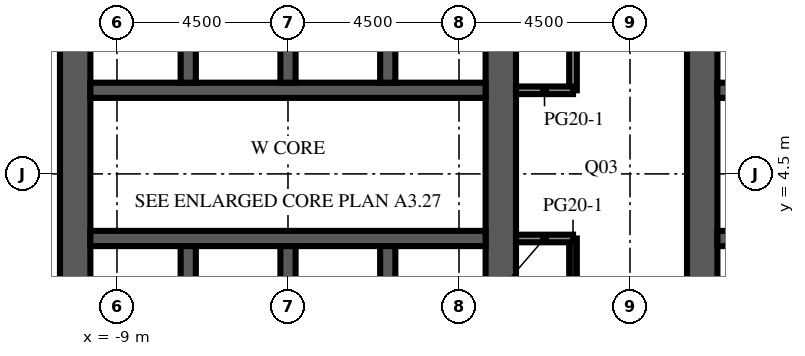
"""IFC4 building model, lengths in metres.
Left out: names, types, materials, properties, quantities, classifications, styles, units other than length and angle.
Written with IfcOpenShell. Run it as: python <this file> out.ifc"""

import sys

from ifc_helpers import new_model, si_unit, direction, frame, frame_2d, origin, place, context, subcontext, project, spatial, rectangle, extrude, element, fill, save


model = new_model("IFC4")
c1 = context("Model", 3, precision=1e-05, world=origin(), true_north=direction((0.0, 1.0)))
c2 = subcontext(c1, "Body", "Model", "MODEL_VIEW")
j1 = project(units=[si_unit("LENGTHUNIT", "METRE"), si_unit("PLANEANGLEUNIT", "RADIAN")], contexts=[c1])
p1 = place(None, origin())
s1 = spatial("IfcSite", under=j1, at=p1, CompositionType="ELEMENT")
p2 = place(p1, origin())
s2 = spatial("IfcBuilding", under=s1, at=p2, CompositionType="ELEMENT")
p3 = place(p2, frame((0.0, 0.0, 177.3)))
s3 = spatial("IfcBuildingStorey", under=s2, at=p3, CompositionType="ELEMENT", Elevation=177.3)
p4 = place(p3, frame((-10.1, -9.0, 0.0), z_axis=(0.0, 0.0, 1.0), x_axis=(0.0, 1.0, 0.0)))
e1 = element("IfcWall", 1, at=p4, inside=s3, PredefinedType="SHEAR", context=c2, shape_type="SweptSolid", body=[
    extrude(rectangle(XDim=27.5, YDim=0.8, at=frame_2d((13.75, 0.0))), origin(), (0.0, 0.0, 1.0), 4.1),
])
p5 = place(p4, frame((12.55, 0.0, 0.0)))
e2 = element("IfcOpeningElement", 2, at=p5, cuts=e1, PredefinedType="OPENING", context=c2, shape_type="SweptSolid", body=[
    extrude(rectangle(XDim=2.4, YDim=2.4, at=frame_2d((1.2, 1.2))), frame((0.0, 0.41, 0.0), z_axis=(0.0, -1.0, 0.0), x_axis=(1.0, 0.0, 0.0)), (0.0, 0.0, 1.0), 0.82),
])
p6 = place(p4, frame((6.825, 0.0, 0.0)))
e3 = element("IfcOpeningElement", 3, at=p6, cuts=e1, PredefinedType="OPENING", context=c2, shape_type="SweptSolid", body=[
    extrude(rectangle(XDim=1.2, YDim=2.1, at=frame_2d((0.6, 1.05))), frame((0.0, 0.41, 0.0), z_axis=(0.0, -1.0, 0.0), x_axis=(1.0, 0.0, 0.0)), (0.0, 0.0, 1.0), 0.82),
])
p7 = place(p4, frame((19.475, 0.0, 0.0)))
e4 = element("IfcOpeningElement", 4, at=p7, cuts=e1, PredefinedType="OPENING", context=c2, shape_type="SweptSolid", body=[
    extrude(rectangle(XDim=1.2, YDim=2.1, at=frame_2d((0.6, 1.05))), frame((0.0, 0.41, 0.0), z_axis=(0.0, -1.0, 0.0), x_axis=(1.0, 0.0, 0.0)), (0.0, 0.0, 1.0), 0.82),
])
p8 = place(p3, frame((1.1, -9.0, 0.0), z_axis=(0.0, 0.0, 1.0), x_axis=(0.0, 1.0, 0.0)))
e5 = element("IfcWall", 5, at=p8, inside=s3, PredefinedType="SHEAR", context=c2, shape_type="SweptSolid", body=[
    extrude(rectangle(XDim=27.5, YDim=0.8, at=frame_2d((13.75, 0.0))), origin(), (0.0, 0.0, 1.0), 4.1),
])
p9 = place(p8, frame((12.55, 0.0, 0.0)))
e6 = element("IfcOpeningElement", 6, at=p9, cuts=e5, PredefinedType="OPENING", context=c2, shape_type="SweptSolid", body=[
    extrude(rectangle(XDim=2.4, YDim=2.4, at=frame_2d((1.2, 1.2))), frame((0.0, 0.41, 0.0), z_axis=(0.0, -1.0, 0.0), x_axis=(1.0, 0.0, 0.0)), (0.0, 0.0, 1.0), 0.82),
])
p10 = place(p8, frame((3.85, 0.0, 0.0)))
e7 = element("IfcOpeningElement", 7, at=p10, cuts=e5, PredefinedType="OPENING", context=c2, shape_type="SweptSolid", body=[
    extrude(rectangle(XDim=0.95, YDim=2.1, at=frame_2d((0.475, 1.05))), frame((0.0, 0.41, 0.0), z_axis=(0.0, -1.0, 0.0), x_axis=(1.0, 0.0, 0.0)), (0.0, 0.0, 1.0), 0.82),
])
p11 = place(p8, frame((23.475, 0.0, 0.0)))
e8 = element("IfcOpeningElement", 8, at=p11, cuts=e5, PredefinedType="OPENING", context=c2, shape_type="SweptSolid", body=[
    extrude(rectangle(XDim=1.2, YDim=2.1, at=frame_2d((0.6, 1.05))), frame((0.0, 0.41, 0.0), z_axis=(0.0, -1.0, 0.0), x_axis=(1.0, 0.0, 0.0)), (0.0, 0.0, 1.0), 0.82),
])
p12 = place(p3, frame((-9.7, 2.8, 0.0), z_axis=(0.0, 0.0, 1.0), x_axis=(1.0, 0.0, 0.0)))
e9 = element("IfcWall", 9, at=p12, inside=s3, PredefinedType="SHEAR", context=c2, shape_type="SweptSolid", body=[
    extrude(rectangle(XDim=10.4, YDim=0.4, at=frame_2d((5.2, 0.0))), origin(), (0.0, 0.0, 1.0), 4.1),
])
p13 = place(p12, frame((0.738, 0.0, 0.0)))
e10 = element("IfcOpeningElement", 10, at=p13, cuts=e9, PredefinedType="OPENING", context=c2, shape_type="SweptSolid", body=[
    extrude(rectangle(XDim=1.1, YDim=2.1, at=frame_2d((0.55, 1.05))), frame((0.0, 0.21, 0.0), z_axis=(0.0, -1.0, 0.0), x_axis=(1.0, 0.0, 0.0)), (0.0, 0.0, 1.0), 0.42),
])
p14 = place(p12, frame((3.337, 0.0, 0.0)))
e11 = element("IfcOpeningElement", 11, at=p14, cuts=e9, PredefinedType="OPENING", context=c2, shape_type="SweptSolid", body=[
    extrude(rectangle(XDim=1.1, YDim=2.1, at=frame_2d((0.55, 1.05))), frame((0.0, 0.21, 0.0), z_axis=(0.0, -1.0, 0.0), x_axis=(1.0, 0.0, 0.0)), (0.0, 0.0, 1.0), 0.42),
])
p15 = place(p12, frame((6.012, 0.0, 0.0)))
e12 = element("IfcOpeningElement", 12, at=p15, cuts=e9, PredefinedType="OPENING", context=c2, shape_type="SweptSolid", body=[
    extrude(rectangle(XDim=1.0, YDim=2.1, at=frame_2d((0.5, 1.05))), frame((0.0, 0.21, 0.0), z_axis=(0.0, -1.0, 0.0), x_axis=(1.0, 0.0, 0.0)), (0.0, 0.0, 1.0), 0.42),
])
p16 = place(p12, frame((8.613, 0.0, 0.0)))
e13 = element("IfcOpeningElement", 13, at=p16, cuts=e9, PredefinedType="OPENING", context=c2, shape_type="SweptSolid", body=[
    extrude(rectangle(XDim=1.0, YDim=2.1, at=frame_2d((0.5, 1.05))), frame((0.0, 0.21, 0.0), z_axis=(0.0, -1.0, 0.0), x_axis=(1.0, 0.0, 0.0)), (0.0, 0.0, 1.0), 0.42),
])
p17 = place(p3, frame((-9.7, 6.7, 0.0), z_axis=(0.0, 0.0, 1.0), x_axis=(1.0, 0.0, 0.0)))
e14 = element("IfcWall", 14, at=p17, inside=s3, PredefinedType="SHEAR", context=c2, shape_type="SweptSolid", body=[
    extrude(rectangle(XDim=10.4, YDim=0.4, at=frame_2d((5.2, 0.0))), origin(), (0.0, 0.0, 1.0), 4.1),
])
p18 = place(p17, frame((3.337, 0.0, 0.0)))
e15 = element("IfcOpeningElement", 15, at=p18, cuts=e14, PredefinedType="OPENING", context=c2, shape_type="SweptSolid", body=[
    extrude(rectangle(XDim=1.1, YDim=2.1, at=frame_2d((0.55, 1.05))), frame((0.0, 0.21, 0.0), z_axis=(0.0, -1.0, 0.0), x_axis=(1.0, 0.0, 0.0)), (0.0, 0.0, 1.0), 0.42),
])
p19 = place(p17, frame((5.962, 0.0, 0.0)))
e16 = element("IfcOpeningElement", 16, at=p19, cuts=e14, PredefinedType="OPENING", context=c2, shape_type="SweptSolid", body=[
    extrude(rectangle(XDim=1.1, YDim=2.1, at=frame_2d((0.55, 1.05))), frame((0.0, 0.21, 0.0), z_axis=(0.0, -1.0, 0.0), x_axis=(1.0, 0.0, 0.0)), (0.0, 0.0, 1.0), 0.42),
])
p20 = place(p17, frame((8.663, 0.0, 0.0)))
e17 = element("IfcOpeningElement", 17, at=p20, cuts=e14, PredefinedType="OPENING", context=c2, shape_type="SweptSolid", body=[
    extrude(rectangle(XDim=1.1, YDim=2.1, at=frame_2d((0.55, 1.05))), frame((0.0, 0.21, 0.0), z_axis=(0.0, -1.0, 0.0), x_axis=(1.0, 0.0, 0.0)), (0.0, 0.0, 1.0), 0.42),
])
p21 = place(p17, frame((0.688, 0.0, 0.0)))
e18 = element("IfcOpeningElement", 18, at=p21, cuts=e14, PredefinedType="OPENING", context=c2, shape_type="SweptSolid", body=[
    extrude(rectangle(XDim=1.0, YDim=2.1, at=frame_2d((0.5, 1.05))), frame((0.0, 0.21, 0.0), z_axis=(0.0, -1.0, 0.0), x_axis=(1.0, 0.0, 0.0)), (0.0, 0.0, 1.0), 0.42),
])
for number, where, z_axis, x_axis in (
    (19, (-7.125, -0.3, 0.0), (0.0, 0.0, 1.0), (0.0, 1.0, 0.0)),
    (20, (-7.125, 6.9, 0.0), (0.0, 0.0, 1.0), (0.0, 1.0, 0.0)),
    (21, (-4.5, -0.3, 0.0), (0.0, 0.0, 1.0), (0.0, 1.0, 0.0)),
    (22, (-4.5, 6.9, 0.0), (0.0, 0.0, 1.0), (0.0, 1.0, 0.0)),
    (23, (-1.875, -0.3, 0.0), (0.0, 0.0, 1.0), (0.0, 1.0, 0.0)),
    (24, (-1.875, 6.9, 0.0), (0.0, 0.0, 1.0), (0.0, 1.0, 0.0)),
):
    element("IfcWall", number, at=place(p3, frame(where, z_axis=z_axis, x_axis=x_axis)), inside=s3, PredefinedType="SHEAR", context=c2, shape_type="SweptSolid", body=[
        extrude(rectangle(XDim=2.9, YDim=0.4, at=frame_2d((1.45, 0.0))), origin(), (0.0, 0.0, 1.0), 4.1),
    ])
p22 = place(p3, frame((6.4, -9.0, 0.0), z_axis=(0.0, 0.0, 1.0), x_axis=(0.0, 1.0, 0.0)))
e25 = element("IfcWall", 25, at=p22, inside=s3, PredefinedType="SHEAR", context=c2, shape_type="SweptSolid", body=[
    extrude(rectangle(XDim=27.5, YDim=0.8, at=frame_2d((13.75, 0.0))), origin(), (0.0, 0.0, 1.0), 4.1),
])
p23 = place(p22, frame((12.55, 0.0, 0.0)))
e26 = element("IfcOpeningElement", 26, at=p23, cuts=e25, PredefinedType="OPENING", context=c2, shape_type="SweptSolid", body=[
    extrude(rectangle(XDim=2.4, YDim=2.4, at=frame_2d((1.2, 1.2))), frame((0.0, 0.41, 0.0), z_axis=(0.0, -1.0, 0.0), x_axis=(1.0, 0.0, 0.0)), (0.0, 0.0, 1.0), 0.82),
])
p24 = place(p22, frame((3.85, 0.0, 0.0)))
e27 = element("IfcOpeningElement", 27, at=p24, cuts=e25, PredefinedType="OPENING", context=c2, shape_type="SweptSolid", body=[
    extrude(rectangle(XDim=0.95, YDim=2.1, at=frame_2d((0.475, 1.05))), frame((0.0, 0.41, 0.0), z_axis=(0.0, -1.0, 0.0), x_axis=(1.0, 0.0, 0.0)), (0.0, 0.0, 1.0), 0.82),
])
p25 = place(p22, frame((23.475, 0.0, 0.0)))
e28 = element("IfcOpeningElement", 28, at=p25, cuts=e25, PredefinedType="OPENING", context=c2, shape_type="SweptSolid", body=[
    extrude(rectangle(XDim=1.2, YDim=2.1, at=frame_2d((0.6, 1.05))), frame((0.0, 0.41, 0.0), z_axis=(0.0, -1.0, 0.0), x_axis=(1.0, 0.0, 0.0)), (0.0, 0.0, 1.0), 0.82),
])
p26 = place(p3, frame((6.8, 2.8, 0.0), z_axis=(0.0, 0.0, 1.0), x_axis=(1.0, 0.0, 0.0)))
e29 = element("IfcWall", 29, at=p26, inside=s3, PredefinedType="SHEAR", context=c2, shape_type="SweptSolid", body=[
    extrude(rectangle(XDim=10.4, YDim=0.4, at=frame_2d((5.2, 0.0))), origin(), (0.0, 0.0, 1.0), 4.1),
])
p27 = place(p26, frame((0.738, 0.0, 0.0)))
e30 = element("IfcOpeningElement", 30, at=p27, cuts=e29, PredefinedType="OPENING", context=c2, shape_type="SweptSolid", body=[
    extrude(rectangle(XDim=1.1, YDim=2.1, at=frame_2d((0.55, 1.05))), frame((0.0, 0.21, 0.0), z_axis=(0.0, -1.0, 0.0), x_axis=(1.0, 0.0, 0.0)), (0.0, 0.0, 1.0), 0.42),
])
p28 = place(p26, frame((3.337, 0.0, 0.0)))
e31 = element("IfcOpeningElement", 31, at=p28, cuts=e29, PredefinedType="OPENING", context=c2, shape_type="SweptSolid", body=[
    extrude(rectangle(XDim=1.1, YDim=2.1, at=frame_2d((0.55, 1.05))), frame((0.0, 0.21, 0.0), z_axis=(0.0, -1.0, 0.0), x_axis=(1.0, 0.0, 0.0)), (0.0, 0.0, 1.0), 0.42),
])
p29 = place(p26, frame((6.012, 0.0, 0.0)))
e32 = element("IfcOpeningElement", 32, at=p29, cuts=e29, PredefinedType="OPENING", context=c2, shape_type="SweptSolid", body=[
    extrude(rectangle(XDim=1.0, YDim=2.1, at=frame_2d((0.5, 1.05))), frame((0.0, 0.21, 0.0), z_axis=(0.0, -1.0, 0.0), x_axis=(1.0, 0.0, 0.0)), (0.0, 0.0, 1.0), 0.42),
])
p30 = place(p26, frame((8.613, 0.0, 0.0)))
e33 = element("IfcOpeningElement", 33, at=p30, cuts=e29, PredefinedType="OPENING", context=c2, shape_type="SweptSolid", body=[
    extrude(rectangle(XDim=1.0, YDim=2.1, at=frame_2d((0.5, 1.05))), frame((0.0, 0.21, 0.0), z_axis=(0.0, -1.0, 0.0), x_axis=(1.0, 0.0, 0.0)), (0.0, 0.0, 1.0), 0.42),
])
p31 = place(p3, frame((6.8, 6.7, 0.0), z_axis=(0.0, 0.0, 1.0), x_axis=(1.0, 0.0, 0.0)))
e34 = element("IfcWall", 34, at=p31, inside=s3, PredefinedType="SHEAR", context=c2, shape_type="SweptSolid", body=[
    extrude(rectangle(XDim=10.4, YDim=0.4, at=frame_2d((5.2, 0.0))), origin(), (0.0, 0.0, 1.0), 4.1),
])
p32 = place(p31, frame((3.337, 0.0, 0.0)))
e35 = element("IfcOpeningElement", 35, at=p32, cuts=e34, PredefinedType="OPENING", context=c2, shape_type="SweptSolid", body=[
    extrude(rectangle(XDim=1.1, YDim=2.1, at=frame_2d((0.55, 1.05))), frame((0.0, 0.21, 0.0), z_axis=(0.0, -1.0, 0.0), x_axis=(1.0, 0.0, 0.0)), (0.0, 0.0, 1.0), 0.42),
])
p33 = place(p31, frame((5.962, 0.0, 0.0)))
e36 = element("IfcOpeningElement", 36, at=p33, cuts=e34, PredefinedType="OPENING", context=c2, shape_type="SweptSolid", body=[
    extrude(rectangle(XDim=1.1, YDim=2.1, at=frame_2d((0.55, 1.05))), frame((0.0, 0.21, 0.0), z_axis=(0.0, -1.0, 0.0), x_axis=(1.0, 0.0, 0.0)), (0.0, 0.0, 1.0), 0.42),
])
p34 = place(p31, frame((8.663, 0.0, 0.0)))
e37 = element("IfcOpeningElement", 37, at=p34, cuts=e34, PredefinedType="OPENING", context=c2, shape_type="SweptSolid", body=[
    extrude(rectangle(XDim=1.1, YDim=2.1, at=frame_2d((0.55, 1.05))), frame((0.0, 0.21, 0.0), z_axis=(0.0, -1.0, 0.0), x_axis=(1.0, 0.0, 0.0)), (0.0, 0.0, 1.0), 0.42),
])
p35 = place(p31, frame((0.688, 0.0, 0.0)))
e38 = element("IfcOpeningElement", 38, at=p35, cuts=e34, PredefinedType="OPENING", context=c2, shape_type="SweptSolid", body=[
    extrude(rectangle(XDim=1.0, YDim=2.1, at=frame_2d((0.5, 1.05))), frame((0.0, 0.21, 0.0), z_axis=(0.0, -1.0, 0.0), x_axis=(1.0, 0.0, 0.0)), (0.0, 0.0, 1.0), 0.42),
])
p36 = place(p3, frame((3.0, -3.5, 0.0), z_axis=(0.0, 0.0, 1.0), x_axis=(0.0, 1.0, 0.0)))
e39 = element("IfcWall", 39, at=p36, inside=s3, PredefinedType="PARTITIONING", context=c2, shape_type="SweptSolid", body=[
    extrude(rectangle(XDim=6.3, YDim=0.2, at=frame_2d((3.15, 0.0))), origin(), (0.0, 0.0, 1.0), 3.65),
])
p37 = place(p36, frame((2.6, 0.0, 0.0)))
e40 = element("IfcOpeningElement", 40, at=p37, cuts=e39, PredefinedType="OPENING", context=c2, shape_type="SweptSolid", body=[
    extrude(rectangle(XDim=1.0, YDim=2.1, at=frame_2d((0.5, 1.05))), frame((0.0, 0.11, 0.0), z_axis=(0.0, -1.0, 0.0), x_axis=(1.0, 0.0, 0.0)), (0.0, 0.0, 1.0), 0.22),
])
p38 = place(p3, frame((3.0, 6.7, 0.0), z_axis=(0.0, 0.0, 1.0), x_axis=(0.0, 1.0, 0.0)))
e41 = element("IfcWall", 41, at=p38, inside=s3, PredefinedType="PARTITIONING", context=c2, shape_type="SweptSolid", body=[
    extrude(rectangle(XDim=11.8, YDim=0.2, at=frame_2d((5.9, 0.0))), origin(), (0.0, 0.0, 1.0), 3.65),
])
p39 = place(p38, frame((4.35, 0.0, 0.0)))
e42 = element("IfcOpeningElement", 42, at=p39, cuts=e41, PredefinedType="OPENING", context=c2, shape_type="SweptSolid", body=[
    extrude(rectangle(XDim=1.0, YDim=2.1, at=frame_2d((0.5, 1.05))), frame((0.0, 0.11, 0.0), z_axis=(0.0, -1.0, 0.0), x_axis=(1.0, 0.0, 0.0)), (0.0, 0.0, 1.0), 0.22),
])
for number, where, z_axis, x_axis in (
    (43, (1.5, 2.8, 0.0), (0.0, 0.0, 1.0), (1.0, 0.0, 0.0)),
    (44, (1.5, 6.7, 0.0), (0.0, 0.0, 1.0), (1.0, 0.0, 0.0)),
):
    element("IfcWall", number, at=place(p3, frame(where, z_axis=z_axis, x_axis=x_axis)), inside=s3, PredefinedType="PARTITIONING", context=c2, shape_type="SweptSolid", body=[
        extrude(rectangle(XDim=1.5, YDim=0.2, at=frame_2d((0.75, 0.0))), origin(), (0.0, 0.0, 1.0), 3.65),
    ])
p40 = place(p13, origin())
e45 = element("IfcDoor", 45, at=p40, inside=s3, OperationType="DOUBLE_DOOR_SLIDING", PredefinedType="DOOR", context=c2, shape_type="SweptSolid", body=[
    extrude(rectangle(XDim=1.1, YDim=2.1, at=frame_2d((0.55, 1.05))), frame((0.0, 0.025, 0.0), z_axis=(0.0, -1.0, 0.0), x_axis=(1.0, 0.0, 0.0)), (0.0, 0.0, 1.0), 0.05),
])
fill(e10, e45)
p41 = place(p14, origin())
e46 = element("IfcDoor", 46, at=p41, inside=s3, OperationType="DOUBLE_DOOR_SLIDING", PredefinedType="DOOR", context=c2, shape_type="SweptSolid", body=[
    extrude(rectangle(XDim=1.1, YDim=2.1, at=frame_2d((0.55, 1.05))), frame((0.0, 0.025, 0.0), z_axis=(0.0, -1.0, 0.0), x_axis=(1.0, 0.0, 0.0)), (0.0, 0.0, 1.0), 0.05),
])
fill(e11, e46)
p42 = place(p18, origin())
e47 = element("IfcDoor", 47, at=p42, inside=s3, OperationType="DOUBLE_DOOR_SLIDING", PredefinedType="DOOR", context=c2, shape_type="SweptSolid", body=[
    extrude(rectangle(XDim=1.1, YDim=2.1, at=frame_2d((0.55, 1.05))), frame((0.0, 0.025, 0.0), z_axis=(0.0, -1.0, 0.0), x_axis=(1.0, 0.0, 0.0)), (0.0, 0.0, 1.0), 0.05),
])
fill(e15, e47)
p43 = place(p19, origin())
e48 = element("IfcDoor", 48, at=p43, inside=s3, OperationType="DOUBLE_DOOR_SLIDING", PredefinedType="DOOR", context=c2, shape_type="SweptSolid", body=[
    extrude(rectangle(XDim=1.1, YDim=2.1, at=frame_2d((0.55, 1.05))), frame((0.0, 0.025, 0.0), z_axis=(0.0, -1.0, 0.0), x_axis=(1.0, 0.0, 0.0)), (0.0, 0.0, 1.0), 0.05),
])
fill(e16, e48)
p44 = place(p20, origin())
e49 = element("IfcDoor", 49, at=p44, inside=s3, OperationType="DOUBLE_DOOR_SLIDING", PredefinedType="DOOR", context=c2, shape_type="SweptSolid", body=[
    extrude(rectangle(XDim=1.1, YDim=2.1, at=frame_2d((0.55, 1.05))), frame((0.0, 0.025, 0.0), z_axis=(0.0, -1.0, 0.0), x_axis=(1.0, 0.0, 0.0)), (0.0, 0.0, 1.0), 0.05),
])
fill(e17, e49)
p45 = place(p5, origin())
e50 = element("IfcDoor", 50, at=p45, inside=s3, OperationType="DOUBLE_DOOR_DOUBLE_SWING", PredefinedType="DOOR", context=c2, shape_type="SweptSolid", body=[
    extrude(rectangle(XDim=2.4, YDim=2.4, at=frame_2d((1.2, 1.2))), frame((0.0, 0.025, 0.0), z_axis=(0.0, -1.0, 0.0), x_axis=(1.0, 0.0, 0.0)), (0.0, 0.0, 1.0), 0.05),
])
fill(e2, e50)
p46 = place(p9, origin())
e51 = element("IfcDoor", 51, at=p46, inside=s3, OperationType="DOUBLE_DOOR_DOUBLE_SWING", PredefinedType="DOOR", context=c2, shape_type="SweptSolid", body=[
    extrude(rectangle(XDim=2.4, YDim=2.4, at=frame_2d((1.2, 1.2))), frame((0.0, 0.025, 0.0), z_axis=(0.0, -1.0, 0.0), x_axis=(1.0, 0.0, 0.0)), (0.0, 0.0, 1.0), 0.05),
])
fill(e6, e51)
p47 = place(p23, origin())
e52 = element("IfcDoor", 52, at=p47, inside=s3, OperationType="DOUBLE_DOOR_DOUBLE_SWING", PredefinedType="DOOR", context=c2, shape_type="SweptSolid", body=[
    extrude(rectangle(XDim=2.4, YDim=2.4, at=frame_2d((1.2, 1.2))), frame((0.0, 0.025, 0.0), z_axis=(0.0, -1.0, 0.0), x_axis=(1.0, 0.0, 0.0)), (0.0, 0.0, 1.0), 0.05),
])
fill(e26, e52)
p48 = place(p15, origin())
e53 = element("IfcDoor", 53, at=p48, inside=s3, OperationType="SINGLE_SWING_LEFT", PredefinedType="DOOR", context=c2, shape_type="SweptSolid", body=[
    extrude(rectangle(XDim=1.0, YDim=2.1, at=frame_2d((0.5, 1.05))), frame((0.0, 0.025, 0.0), z_axis=(0.0, -1.0, 0.0), x_axis=(1.0, 0.0, 0.0)), (0.0, 0.0, 1.0), 0.05),
])
fill(e12, e53)
p49 = place(p16, origin())
e54 = element("IfcDoor", 54, at=p49, inside=s3, OperationType="SINGLE_SWING_RIGHT", PredefinedType="DOOR", context=c2, shape_type="SweptSolid", body=[
    extrude(rectangle(XDim=1.0, YDim=2.1, at=frame_2d((0.5, 1.05))), frame((0.0, 0.025, 0.0), z_axis=(0.0, -1.0, 0.0), x_axis=(1.0, 0.0, 0.0)), (0.0, 0.0, 1.0), 0.05),
])
fill(e13, e54)
p50 = place(p21, origin())
e55 = element("IfcDoor", 55, at=p50, inside=s3, OperationType="SINGLE_SWING_LEFT", PredefinedType="DOOR", context=c2, shape_type="SweptSolid", body=[
    extrude(rectangle(XDim=1.0, YDim=2.1, at=frame_2d((0.5, 1.05))), frame((0.0, 0.025, 0.0), z_axis=(0.0, -1.0, 0.0), x_axis=(1.0, 0.0, 0.0)), (0.0, 0.0, 1.0), 0.05),
])
fill(e18, e55)
save(model, sys.argv[1])
